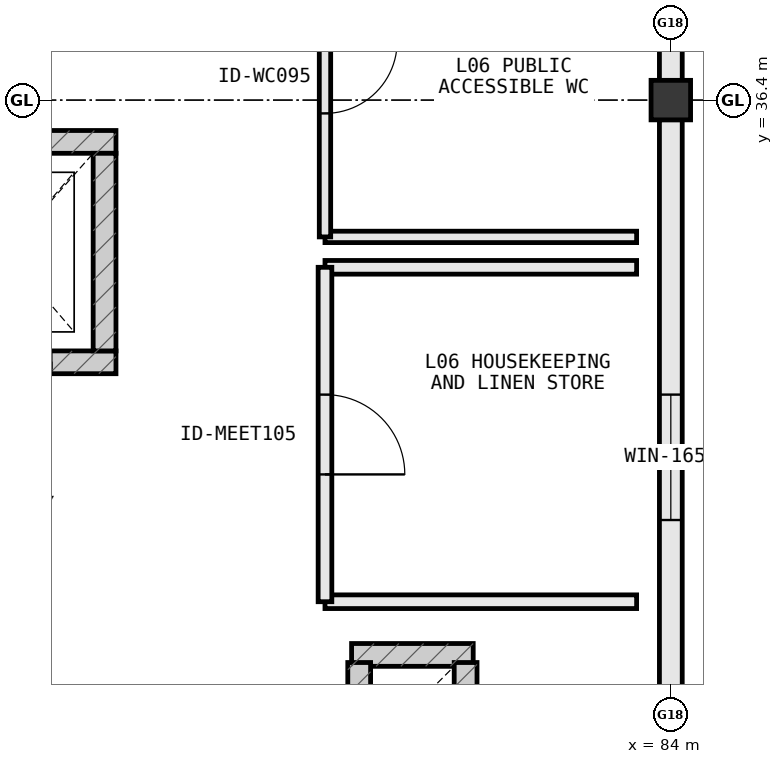
"""IFC4 building model, lengths in metres.
Left out: names, types, materials, properties, quantities, classifications, styles, units other than length and angle.
Written with IfcOpenShell. Run it as: python <this file> out.ifc"""

import sys

from ifc_helpers import new_model, si_unit, direction, frame, frame_2d, origin, origin_2d, place, context, subcontext, project, spatial, rectangle, extrude, element, fill, save


model = new_model("IFC4")
c1 = context("Model", 3, precision=1e-05, world=origin(), true_north=direction((0.0, 1.0)))
c2 = subcontext(c1, "Body", "Model", "MODEL_VIEW")
j1 = project(units=[si_unit("LENGTHUNIT", "METRE"), si_unit("PLANEANGLEUNIT", "RADIAN")], contexts=[c1])
p1 = place(None, origin())
s1 = spatial("IfcSite", under=j1, at=p1, CompositionType="ELEMENT")
p2 = place(p1, origin())
s2 = spatial("IfcBuilding", under=s1, at=p2, CompositionType="ELEMENT")
p3 = place(p2, frame((0.0, 0.0, 27.6)))
s3 = spatial("IfcBuildingStorey", under=s2, at=p3, CompositionType="ELEMENT", Elevation=27.6)
p4 = place(p3, frame((84.0, 36.4, 0.0), z_axis=(0.0, 0.0, 1.0), x_axis=(1.0, 0.0, 0.0)))
e1 = element("IfcColumn", 1, at=p4, inside=s3, PredefinedType="COLUMN", context=c2, shape_type="SweptSolid", body=[
    extrude(rectangle(XDim=0.52, YDim=0.52, at=origin_2d()), origin(), (0.0, 0.0, 1.0), 3.8),
])
p5 = place(p3, frame((81.4, 29.1, 0.0), z_axis=(0.0, 0.0, 1.0), x_axis=(-1.0, 0.0, 0.0)))
e2 = element("IfcWall", 2, at=p5, inside=s3, PredefinedType="SHEAR", context=c2, shape_type="SweptSolid", body=[
    extrude(rectangle(XDim=1.6, YDim=0.3, at=frame_2d((0.8, 0.0))), origin(), (0.0, 0.0, 1.0), 3.555),
])
for number, where, z_axis, x_axis in (
    (3, (79.9, 29.0, 0.0), (0.0, 0.0, 1.0), (0.0, -1.0, 0.0)),
    (4, (81.3, 27.8, 0.0), (0.0, 0.0, 1.0), (0.0, 1.0, 0.0)),
):
    element("IfcWall", number, at=place(p3, frame(where, z_axis=z_axis, x_axis=x_axis)), inside=s3, PredefinedType="SHEAR", context=c2, shape_type="SweptSolid", body=[
        extrude(rectangle(XDim=1.2, YDim=0.3, at=frame_2d((0.6, 0.0))), origin(), (0.0, 0.0, 1.0), 3.555),
    ])
p6 = place(p3, frame((84.0, 27.258, 0.0), z_axis=(0.0, 0.0, 1.0), x_axis=(0.0, 1.0, 0.0)))
e5 = element("IfcWall", 5, at=p6, inside=s3, PredefinedType="STANDARD", context=c2, shape_type="SweptSolid", body=[
    extrude(rectangle(XDim=8.884, YDim=0.3, at=frame_2d((4.442, 0.0))), origin(), (0.0, 0.0, 1.0), 2.97),
])
p7 = place(p6, frame((3.617, 0.0, 0.85)))
e6 = element("IfcOpeningElement", 6, at=p7, cuts=e5, PredefinedType="OPENING", context=c2, shape_type="SweptSolid", body=[
    extrude(rectangle(XDim=1.65, YDim=1.8, at=frame_2d((0.825, 0.9))), frame((0.0, 0.162, 0.0), z_axis=(0.0, -1.0, 0.0), x_axis=(1.0, 0.0, 0.0)), (0.0, 0.0, 1.0), 0.324),
])
p8 = place(p3, frame((84.0, 36.658, 0.0), z_axis=(0.0, 0.0, 1.0), x_axis=(0.0, 1.0, 0.0)))
e7 = element("IfcWall", 7, at=p8, inside=s3, PredefinedType="STANDARD", context=c2, shape_type="SweptSolid", body=[
    extrude(rectangle(XDim=10.284, YDim=0.3, at=frame_2d((5.142, 0.0))), origin(), (0.0, 0.0, 1.0), 2.97),
])
p9 = place(p8, frame((6.888, 0.0, 0.85)))
e8 = element("IfcOpeningElement", 8, at=p9, cuts=e7, PredefinedType="OPENING", context=c2, shape_type="SweptSolid", body=[
    extrude(rectangle(XDim=1.65, YDim=1.8, at=frame_2d((0.825, 0.9))), frame((0.0, 0.162, 0.0), z_axis=(0.0, -1.0, 0.0), x_axis=(1.0, 0.0, 0.0)), (0.0, 0.0, 1.0), 0.324),
])
p10 = place(p3, frame((73.8, 32.95, 0.0), z_axis=(0.0, 0.0, 1.0), x_axis=(1.0, 0.0, 0.0)))
e9 = element("IfcWall", 9, at=p10, inside=s3, PredefinedType="SHEAR", context=c2, shape_type="SweptSolid", body=[
    extrude(rectangle(XDim=2.9, YDim=0.3, at=frame_2d((1.45, 0.0))), origin(), (0.0, 0.0, 1.0), 3.8),
])
p11 = place(p10, frame((0.85, 0.0, 0.0)))
e10 = element("IfcOpeningElement", 10, at=p11, cuts=e9, PredefinedType="OPENING", context=c2, shape_type="SweptSolid", body=[
    extrude(rectangle(XDim=1.2, YDim=2.2, at=frame_2d((0.6, 1.1))), frame((0.0, 0.162, 0.0), z_axis=(0.0, -1.0, 0.0), x_axis=(1.0, 0.0, 0.0)), (0.0, 0.0, 1.0), 0.324),
])
p12 = place(p3, frame((76.7, 35.85, 0.0), z_axis=(0.0, 0.0, 1.0), x_axis=(-1.0, 0.0, 0.0)))
e11 = element("IfcWall", 11, at=p12, inside=s3, PredefinedType="SHEAR", context=c2, shape_type="SweptSolid", body=[
    extrude(rectangle(XDim=2.9, YDim=0.3, at=frame_2d((1.45, 0.0))), origin(), (0.0, 0.0, 1.0), 3.8),
])
p13 = place(p3, frame((76.55, 33.1, 0.0), z_axis=(0.0, 0.0, 1.0), x_axis=(0.0, 1.0, 0.0)))
e12 = element("IfcWall", 12, at=p13, inside=s3, PredefinedType="SHEAR", context=c2, shape_type="SweptSolid", body=[
    extrude(rectangle(XDim=2.6, YDim=0.3, at=frame_2d((1.3, 0.0))), origin(), (0.0, 0.0, 1.0), 3.8),
])
for number, where, z_axis, x_axis in (
    (13, (79.45, 29.8, 0.0), (0.0, 0.0, 1.0), (1.0, 0.0, 0.0)),
    (14, (83.55, 34.2, 0.0), (0.0, 0.0, 1.0), (-1.0, 0.0, 0.0)),
):
    element("IfcWall", number, at=place(p3, frame(where, z_axis=z_axis, x_axis=x_axis)), inside=s3, PredefinedType="PARTITIONING", context=c2, shape_type="SweptSolid", body=[
        extrude(rectangle(XDim=4.1, YDim=0.18, at=frame_2d((2.05, 0.0))), origin(), (0.0, 0.0, 1.0), 3.555),
    ])
p14 = place(p3, frame((79.45, 34.2, 0.0), z_axis=(0.0, 0.0, 1.0), x_axis=(0.0, -1.0, 0.0)))
e15 = element("IfcWall", 15, at=p14, inside=s3, PredefinedType="PARTITIONING", context=c2, shape_type="SweptSolid", body=[
    extrude(rectangle(XDim=4.4, YDim=0.18, at=frame_2d((2.2, 0.0))), origin(), (0.0, 0.0, 1.0), 3.555),
])
p15 = place(p14, frame((1.675, 0.0, 0.0)))
e16 = element("IfcOpeningElement", 16, at=p15, cuts=e15, PredefinedType="OPENING", context=c2, shape_type="SweptSolid", body=[
    extrude(rectangle(XDim=1.05, YDim=2.2, at=frame_2d((0.525, 1.1))), frame((0.0, 0.102, 0.0), z_axis=(0.0, -1.0, 0.0), x_axis=(1.0, 0.0, 0.0)), (0.0, 0.0, 1.0), 0.204),
])
p16 = place(p3, frame((79.45, 34.6, 0.0), z_axis=(0.0, 0.0, 1.0), x_axis=(1.0, 0.0, 0.0)))
e17 = element("IfcWall", 17, at=p16, inside=s3, PredefinedType="PLUMBINGWALL", context=c2, shape_type="SweptSolid", body=[
    extrude(rectangle(XDim=4.1, YDim=0.15, at=frame_2d((2.05, 0.0))), origin(), (0.0, 0.0, 1.0), 3.555),
])
p17 = place(p3, frame((79.45, 38.8, 0.0), z_axis=(0.0, 0.0, 1.0), x_axis=(0.0, -1.0, 0.0)))
e18 = element("IfcWall", 18, at=p17, inside=s3, PredefinedType="PLUMBINGWALL", context=c2, shape_type="SweptSolid", body=[
    extrude(rectangle(XDim=4.2, YDim=0.15, at=frame_2d((2.1, 0.0))), origin(), (0.0, 0.0, 1.0), 3.555),
])
p18 = place(p17, frame((1.625, 0.0, 0.0)))
e19 = element("IfcOpeningElement", 19, at=p18, cuts=e18, PredefinedType="OPENING", context=c2, shape_type="SweptSolid", body=[
    extrude(rectangle(XDim=0.95, YDim=2.15, at=frame_2d((0.475, 1.075))), frame((0.0, 0.087, 0.0), z_axis=(0.0, -1.0, 0.0), x_axis=(1.0, 0.0, 0.0)), (0.0, 0.0, 1.0), 0.174),
])
p19 = place(p7, origin())
e20 = element("IfcWindow", 20, at=p19, inside=s3, PartitioningType="SINGLE_PANEL", PredefinedType="WINDOW", context=c2, shape_type="SweptSolid", body=[
    extrude(rectangle(XDim=1.65, YDim=1.8, at=frame_2d((0.825, 0.9))), frame((0.0, 0.03, 0.0), z_axis=(0.0, -1.0, 0.0), x_axis=(1.0, 0.0, 0.0)), (0.0, 0.0, 1.0), 0.06),
])
fill(e6, e20)
p20 = place(p15, origin())
e21 = element("IfcDoor", 21, at=p20, inside=s3, OperationType="SINGLE_SWING_RIGHT", PredefinedType="DOOR", context=c2, shape_type="SweptSolid", body=[
    extrude(rectangle(XDim=1.05, YDim=2.2, at=frame_2d((0.525, 1.1))), frame((0.0, 0.025, 0.0), z_axis=(0.0, -1.0, 0.0), x_axis=(1.0, 0.0, 0.0)), (0.0, 0.0, 1.0), 0.05),
])
fill(e16, e21)
p21 = place(p18, origin())
e22 = element("IfcDoor", 22, at=p21, inside=s3, OperationType="SINGLE_SWING_LEFT", PredefinedType="DOOR", context=c2, shape_type="SweptSolid", body=[
    extrude(rectangle(XDim=0.95, YDim=2.15, at=frame_2d((0.475, 1.075))), frame((0.0, 0.025, 0.0), z_axis=(0.0, -1.0, 0.0), x_axis=(1.0, 0.0, 0.0)), (0.0, 0.0, 1.0), 0.05),
])
fill(e19, e22)
save(model, sys.argv[1])
